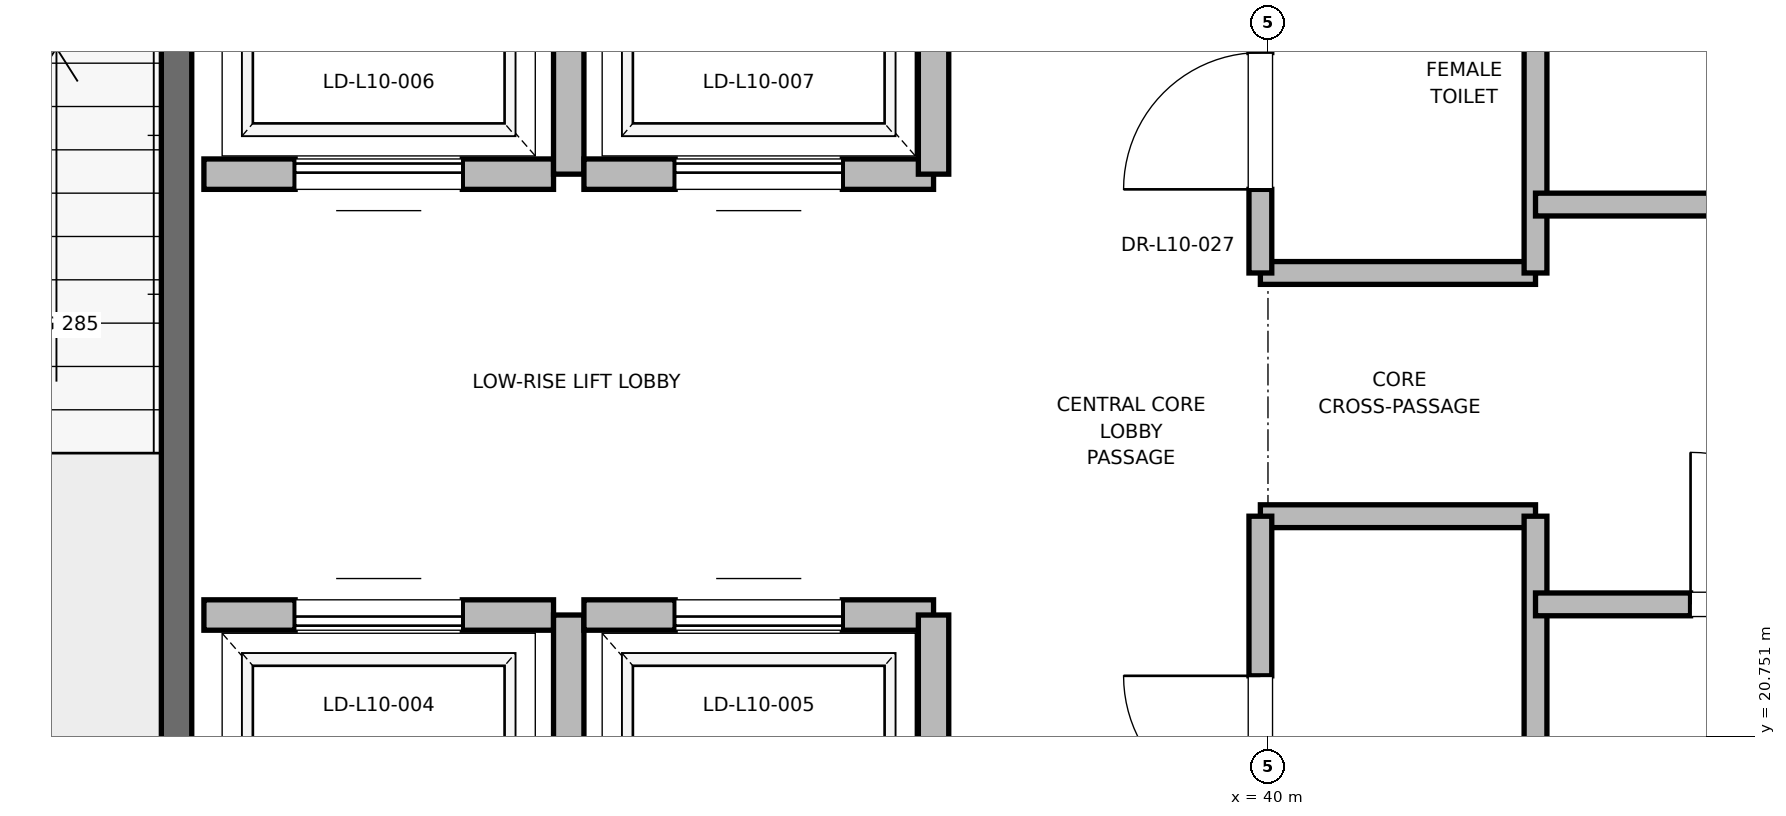
"""IFC4 building model, lengths in metres.
Left out: names, types, materials, properties, quantities, classifications, styles, units other than length and angle.
Written with IfcOpenShell. Run it as: python <this file> out.ifc"""

import sys

from ifc_helpers import new_model, si_unit, direction, frame, frame_2d, origin, place, context, subcontext, project, spatial, rectangle, extrude, element, fill, save


model = new_model("IFC4")
c1 = context("Model", 3, precision=1e-05, world=origin(), true_north=direction((0.0, 1.0)))
c2 = subcontext(c1, "Body", "Model", "MODEL_VIEW")
j1 = project(units=[si_unit("LENGTHUNIT", "METRE"), si_unit("PLANEANGLEUNIT", "RADIAN")], contexts=[c1])
p1 = place(None, origin())
s1 = spatial("IfcSite", under=j1, at=p1, CompositionType="ELEMENT")
p2 = place(p1, origin())
s2 = spatial("IfcBuilding", under=s1, at=p2, CompositionType="ELEMENT")
p3 = place(p2, frame((0.0, 0.0, 47.6)))
s3 = spatial("IfcBuildingStorey", under=s2, at=p3, CompositionType="ELEMENT", Elevation=47.6)
p4 = place(p3, frame((32.82, 18.6, 0.0), z_axis=(0.0, 0.0, 1.0), x_axis=(0.0, 1.0, 0.0)))
e1 = element("IfcWall", 1, at=p4, inside=s3, PredefinedType="SOLIDWALL", context=c2, shape_type="SweptSolid", body=[
    extrude(rectangle(XDim=8.78, YDim=0.2, at=frame_2d((4.39, 0.0))), origin(), (0.0, 0.0, 1.0), 3.76),
])
p5 = place(p3, frame((35.3, 21.55, 0.0), z_axis=(0.0, 0.0, 1.0), x_axis=(-1.0, 0.0, 0.0)))
e2 = element("IfcWall", 2, at=p5, inside=s3, PredefinedType="SOLIDWALL", context=c2, shape_type="SweptSolid", body=[
    extrude(rectangle(XDim=2.3, YDim=0.2, at=frame_2d((1.15, 0.0))), origin(), (0.0, 0.0, 1.0), 3.76),
])
p6 = place(p5, frame((0.6, 0.0, 0.0)))
e3 = element("IfcOpeningElement", 3, at=p6, cuts=e2, PredefinedType="OPENING", context=c2, shape_type="SweptSolid", body=[
    extrude(rectangle(XDim=1.1, YDim=2.2, at=frame_2d((0.55, 1.1))), frame((0.0, 0.1, 0.0), z_axis=(0.0, -1.0, 0.0), x_axis=(1.0, 0.0, 0.0)), (0.0, 0.0, 1.0), 0.2),
])
p7 = place(p3, frame((35.4, 18.95, 0.0), z_axis=(0.0, 0.0, 1.0), x_axis=(0.0, 1.0, 0.0)))
e4 = element("IfcWall", 4, at=p7, inside=s3, PredefinedType="SOLIDWALL", context=c2, shape_type="SweptSolid", body=[
    extrude(rectangle(XDim=2.6, YDim=0.2, at=frame_2d((1.3, 0.0))), origin(), (0.0, 0.0, 1.0), 3.76),
])
p8 = place(p3, frame((37.8, 21.55, 0.0), z_axis=(0.0, 0.0, 1.0), x_axis=(-1.0, 0.0, 0.0)))
e5 = element("IfcWall", 5, at=p8, inside=s3, PredefinedType="SOLIDWALL", context=c2, shape_type="SweptSolid", body=[
    extrude(rectangle(XDim=2.3, YDim=0.2, at=frame_2d((1.15, 0.0))), origin(), (0.0, 0.0, 1.0), 3.76),
])
p9 = place(p8, frame((0.6, 0.0, 0.0)))
e6 = element("IfcOpeningElement", 6, at=p9, cuts=e5, PredefinedType="OPENING", context=c2, shape_type="SweptSolid", body=[
    extrude(rectangle(XDim=1.1, YDim=2.2, at=frame_2d((0.55, 1.1))), frame((0.0, 0.1, 0.0), z_axis=(0.0, -1.0, 0.0), x_axis=(1.0, 0.0, 0.0)), (0.0, 0.0, 1.0), 0.2),
])
p10 = place(p3, frame((37.8, 18.95, 0.0), z_axis=(0.0, 0.0, 1.0), x_axis=(0.0, 1.0, 0.0)))
e7 = element("IfcWall", 7, at=p10, inside=s3, PredefinedType="SOLIDWALL", context=c2, shape_type="SweptSolid", body=[
    extrude(rectangle(XDim=2.6, YDim=0.2, at=frame_2d((1.3, 0.0))), origin(), (0.0, 0.0, 1.0), 2.54),
])
p11 = place(p3, frame((33.0, 24.45, 0.0), z_axis=(0.0, 0.0, 1.0), x_axis=(1.0, 0.0, 0.0)))
e8 = element("IfcWall", 8, at=p11, inside=s3, PredefinedType="SOLIDWALL", context=c2, shape_type="SweptSolid", body=[
    extrude(rectangle(XDim=2.3, YDim=0.2, at=frame_2d((1.15, 0.0))), origin(), (0.0, 0.0, 1.0), 3.76),
])
p12 = place(p11, frame((0.6, 0.0, 0.0)))
e9 = element("IfcOpeningElement", 9, at=p12, cuts=e8, PredefinedType="OPENING", context=c2, shape_type="SweptSolid", body=[
    extrude(rectangle(XDim=1.1, YDim=2.2, at=frame_2d((0.55, 1.1))), frame((0.0, 0.1, 0.0), z_axis=(0.0, -1.0, 0.0), x_axis=(1.0, 0.0, 0.0)), (0.0, 0.0, 1.0), 0.2),
])
p13 = place(p3, frame((35.4, 24.45, 0.0), z_axis=(0.0, 0.0, 1.0), x_axis=(0.0, 1.0, 0.0)))
e10 = element("IfcWall", 10, at=p13, inside=s3, PredefinedType="SOLIDWALL", context=c2, shape_type="SweptSolid", body=[
    extrude(rectangle(XDim=2.6, YDim=0.2, at=frame_2d((1.3, 0.0))), origin(), (0.0, 0.0, 1.0), 3.76),
])
p14 = place(p3, frame((35.5, 24.45, 0.0), z_axis=(0.0, 0.0, 1.0), x_axis=(1.0, 0.0, 0.0)))
e11 = element("IfcWall", 11, at=p14, inside=s3, PredefinedType="SOLIDWALL", context=c2, shape_type="SweptSolid", body=[
    extrude(rectangle(XDim=2.3, YDim=0.2, at=frame_2d((1.15, 0.0))), origin(), (0.0, 0.0, 1.0), 3.76),
])
p15 = place(p14, frame((0.6, 0.0, 0.0)))
e12 = element("IfcOpeningElement", 12, at=p15, cuts=e11, PredefinedType="OPENING", context=c2, shape_type="SweptSolid", body=[
    extrude(rectangle(XDim=1.1, YDim=2.2, at=frame_2d((0.55, 1.1))), frame((0.0, 0.1, 0.0), z_axis=(0.0, -1.0, 0.0), x_axis=(1.0, 0.0, 0.0)), (0.0, 0.0, 1.0), 0.2),
])
p16 = place(p3, frame((37.8, 24.45, 0.0), z_axis=(0.0, 0.0, 1.0), x_axis=(0.0, 1.0, 0.0)))
e13 = element("IfcWall", 13, at=p16, inside=s3, PredefinedType="SOLIDWALL", context=c2, shape_type="SweptSolid", body=[
    extrude(rectangle(XDim=2.6, YDim=0.2, at=frame_2d((1.3, 0.0))), origin(), (0.0, 0.0, 1.0), 3.76),
])
for number, where, z_axis, x_axis in (
    (14, (39.95, 22.2, 0.0), (0.0, 0.0, 1.0), (1.0, 0.0, 0.0)),
    (15, (39.95, 23.8, 0.0), (0.0, 0.0, 1.0), (1.0, 0.0, 0.0)),
):
    element("IfcWall", number, at=place(p3, frame(where, z_axis=z_axis, x_axis=x_axis)), inside=s3, PredefinedType="PARTITIONING", context=c2, shape_type="SweptSolid", body=[
        extrude(rectangle(XDim=1.81, YDim=0.15, at=frame_2d((0.905, 0.0))), origin(), (0.0, 0.0, 1.0), 2.85),
    ])
p17 = place(p3, frame((41.76, 18.6, 0.0), z_axis=(0.0, 0.0, 1.0), x_axis=(0.0, 1.0, 0.0)))
e16 = element("IfcWall", 16, at=p17, inside=s3, PredefinedType="PARTITIONING", context=c2, shape_type="SweptSolid", body=[
    extrude(rectangle(XDim=3.6, YDim=0.15, at=frame_2d((1.8, 0.0))), origin(), (0.0, 0.0, 1.0), 2.54),
])
p18 = place(p3, frame((41.76, 23.8, 0.0), z_axis=(0.0, 0.0, 1.0), x_axis=(0.0, 1.0, 0.0)))
e17 = element("IfcWall", 17, at=p18, inside=s3, PredefinedType="PARTITIONING", context=c2, shape_type="SweptSolid", body=[
    extrude(rectangle(XDim=4.0, YDim=0.15, at=frame_2d((2.0, 0.0))), origin(), (0.0, 0.0, 1.0), 2.85),
])
p19 = place(p3, frame((39.95, 19.2, 0.0), z_axis=(0.0, 0.0, 1.0), x_axis=(0.0, 1.0, 0.0)))
e18 = element("IfcWall", 18, at=p19, inside=s3, PredefinedType="PARTITIONING", context=c2, shape_type="SweptSolid", body=[
    extrude(rectangle(XDim=3.0, YDim=0.15, at=frame_2d((1.5, 0.0))), origin(), (0.0, 0.0, 1.0), 2.85),
])
p20 = place(p19, frame((1.05, 0.0, 0.0)))
e19 = element("IfcOpeningElement", 19, at=p20, cuts=e18, PredefinedType="OPENING", context=c2, shape_type="SweptSolid", body=[
    extrude(rectangle(XDim=0.9, YDim=2.1, at=frame_2d((0.45, 1.05))), frame((0.0, 0.075, 0.0), z_axis=(0.0, -1.0, 0.0), x_axis=(1.0, 0.0, 0.0)), (0.0, 0.0, 1.0), 0.15),
])
p21 = place(p3, frame((39.95, 23.8, 0.0), z_axis=(0.0, 0.0, 1.0), x_axis=(0.0, 1.0, 0.0)))
e20 = element("IfcWall", 20, at=p21, inside=s3, PredefinedType="PARTITIONING", context=c2, shape_type="SweptSolid", body=[
    extrude(rectangle(XDim=2.0, YDim=0.15, at=frame_2d((1.0, 0.0))), origin(), (0.0, 0.0, 1.0), 2.85),
])
p22 = place(p21, frame((0.55, 0.0, 0.0)))
e21 = element("IfcOpeningElement", 21, at=p22, cuts=e20, PredefinedType="OPENING", context=c2, shape_type="SweptSolid", body=[
    extrude(rectangle(XDim=0.9, YDim=2.1, at=frame_2d((0.45, 1.05))), frame((0.0, 0.075, 0.0), z_axis=(0.0, -1.0, 0.0), x_axis=(1.0, 0.0, 0.0)), (0.0, 0.0, 1.0), 0.15),
])
p23 = place(p3, frame((41.76, 21.62, 0.0), z_axis=(0.0, 0.0, 1.0), x_axis=(1.0, 0.0, 0.0)))
e22 = element("IfcWall", 22, at=p23, inside=s3, PredefinedType="PARTITIONING", context=c2, shape_type="SweptSolid", body=[
    extrude(rectangle(XDim=3.04, YDim=0.15, at=frame_2d((1.52, 0.0))), origin(), (0.0, 0.0, 1.0), 2.85),
])
p24 = place(p23, frame((1.02, 0.0, 0.0)))
e23 = element("IfcOpeningElement", 23, at=p24, cuts=e22, PredefinedType="OPENING", context=c2, shape_type="SweptSolid", body=[
    extrude(rectangle(XDim=1.0, YDim=2.15, at=frame_2d((0.5, 1.075))), frame((0.0, 0.075, 0.0), z_axis=(0.0, -1.0, 0.0), x_axis=(1.0, 0.0, 0.0)), (0.0, 0.0, 1.0), 0.15),
])
p25 = place(p3, frame((41.76, 24.25, 0.0), z_axis=(0.0, 0.0, 1.0), x_axis=(1.0, 0.0, 0.0)))
e24 = element("IfcWall", 24, at=p25, inside=s3, PredefinedType="PARTITIONING", context=c2, shape_type="SweptSolid", body=[
    extrude(rectangle(XDim=3.39, YDim=0.15, at=frame_2d((1.695, 0.0))), origin(), (0.0, 0.0, 1.0), 2.85),
])
p26 = place(p25, frame((1.255, 0.0, 0.0)))
e25 = element("IfcOpeningElement", 25, at=p26, cuts=e24, PredefinedType="OPENING", context=c2, shape_type="SweptSolid", body=[
    extrude(rectangle(XDim=0.88, YDim=2.1, at=frame_2d((0.44, 1.05))), frame((0.0, 0.075, 0.0), z_axis=(0.0, -1.0, 0.0), x_axis=(1.0, 0.0, 0.0)), (0.0, 0.0, 1.0), 0.15),
])
p27 = place(p6, origin())
e26 = element("IfcDoor", 26, at=p27, inside=s3, OperationType="SLIDING_TO_RIGHT", PredefinedType="DOOR", context=c2, shape_type="SweptSolid", body=[
    extrude(rectangle(XDim=1.1, YDim=2.2, at=frame_2d((0.55, 1.1))), frame((0.0, 0.025, 0.0), z_axis=(0.0, -1.0, 0.0), x_axis=(1.0, 0.0, 0.0)), (0.0, 0.0, 1.0), 0.05),
])
fill(e3, e26)
p28 = place(p9, origin())
e27 = element("IfcDoor", 27, at=p28, inside=s3, OperationType="SLIDING_TO_RIGHT", PredefinedType="DOOR", context=c2, shape_type="SweptSolid", body=[
    extrude(rectangle(XDim=1.1, YDim=2.2, at=frame_2d((0.55, 1.1))), frame((0.0, 0.025, 0.0), z_axis=(0.0, -1.0, 0.0), x_axis=(1.0, 0.0, 0.0)), (0.0, 0.0, 1.0), 0.05),
])
fill(e6, e27)
p29 = place(p12, origin())
e28 = element("IfcDoor", 28, at=p29, inside=s3, OperationType="SLIDING_TO_RIGHT", PredefinedType="DOOR", context=c2, shape_type="SweptSolid", body=[
    extrude(rectangle(XDim=1.1, YDim=2.2, at=frame_2d((0.55, 1.1))), frame((0.0, 0.025, 0.0), z_axis=(0.0, -1.0, 0.0), x_axis=(1.0, 0.0, 0.0)), (0.0, 0.0, 1.0), 0.05),
])
fill(e9, e28)
p30 = place(p15, origin())
e29 = element("IfcDoor", 29, at=p30, inside=s3, OperationType="SLIDING_TO_RIGHT", PredefinedType="DOOR", context=c2, shape_type="SweptSolid", body=[
    extrude(rectangle(XDim=1.1, YDim=2.2, at=frame_2d((0.55, 1.1))), frame((0.0, 0.025, 0.0), z_axis=(0.0, -1.0, 0.0), x_axis=(1.0, 0.0, 0.0)), (0.0, 0.0, 1.0), 0.05),
])
fill(e12, e29)
p31 = place(p20, origin())
e30 = element("IfcDoor", 30, at=p31, inside=s3, OperationType="SINGLE_SWING_RIGHT", PredefinedType="DOOR", context=c2, shape_type="SweptSolid", body=[
    extrude(rectangle(XDim=0.9, YDim=2.1, at=frame_2d((0.45, 1.05))), frame((0.0, 0.025, 0.0), z_axis=(0.0, -1.0, 0.0), x_axis=(1.0, 0.0, 0.0)), (0.0, 0.0, 1.0), 0.05),
])
fill(e19, e30)
p32 = place(p22, origin())
e31 = element("IfcDoor", 31, at=p32, inside=s3, OperationType="SINGLE_SWING_LEFT", PredefinedType="DOOR", context=c2, shape_type="SweptSolid", body=[
    extrude(rectangle(XDim=0.9, YDim=2.1, at=frame_2d((0.45, 1.05))), frame((0.0, 0.025, 0.0), z_axis=(0.0, -1.0, 0.0), x_axis=(1.0, 0.0, 0.0)), (0.0, 0.0, 1.0), 0.05),
])
fill(e21, e31)
p33 = place(p24, origin())
e32 = element("IfcDoor", 32, at=p33, inside=s3, OperationType="SINGLE_SWING_LEFT", PredefinedType="DOOR", context=c2, shape_type="SweptSolid", body=[
    extrude(rectangle(XDim=1.0, YDim=2.15, at=frame_2d((0.5, 1.075))), frame((0.0, 0.025, 0.0), z_axis=(0.0, -1.0, 0.0), x_axis=(1.0, 0.0, 0.0)), (0.0, 0.0, 1.0), 0.05),
])
fill(e23, e32)
save(model, sys.argv[1])
